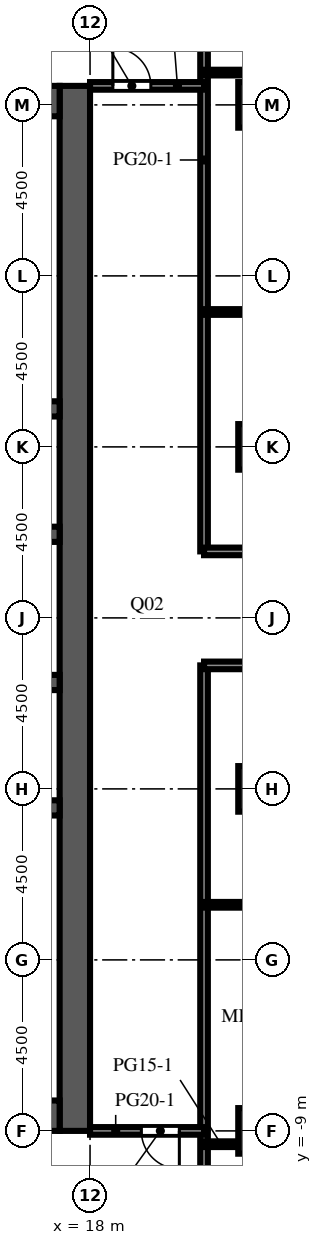
"""IFC4 building model, lengths in metres.
Left out: names, types, materials, properties, quantities, classifications, styles, units other than length and angle.
Written with IfcOpenShell. Run it as: python <this file> out.ifc"""

import sys

from ifc_helpers import new_model, si_unit, direction, frame, frame_2d, origin, origin_2d, place, context, subcontext, project, spatial, rectangle, extrude, element, fill, save


model = new_model("IFC4")
c1 = context("Model", 3, precision=1e-05, world=origin(), true_north=direction((0.0, 1.0)))
c2 = subcontext(c1, "Body", "Model", "MODEL_VIEW")
j1 = project(units=[si_unit("LENGTHUNIT", "METRE"), si_unit("PLANEANGLEUNIT", "RADIAN")], contexts=[c1])
p1 = place(None, origin())
s1 = spatial("IfcSite", under=j1, at=p1, CompositionType="ELEMENT")
p2 = place(p1, origin())
s2 = spatial("IfcBuilding", under=s1, at=p2, CompositionType="ELEMENT")
p3 = place(p2, frame((0.0, 0.0, 207.9)))
s3 = spatial("IfcBuildingStorey", under=s2, at=p3, CompositionType="ELEMENT", Elevation=207.9)
for number, where, z_axis, x_axis in (
    (1, (22.5, -9.0, 0.0), (0.0, 0.0, 1.0), (1.0, 0.0, 0.0)),
    (2, (22.5, 0.0, 0.0), (0.0, 0.0, 1.0), (1.0, 0.0, 0.0)),
    (3, (22.5, 9.0, 0.0), (0.0, 0.0, 1.0), (1.0, 0.0, 0.0)),
    (4, (22.5, 18.0, 0.0), (0.0, 0.0, 1.0), (1.0, 0.0, 0.0)),
):
    element("IfcColumn", number, at=place(p3, frame(where, z_axis=z_axis, x_axis=x_axis)), inside=s3, PredefinedType="COLUMN", context=c2, shape_type="SweptSolid", body=[
        extrude(rectangle(XDim=1.2, YDim=1.2, at=origin_2d()), origin(), (0.0, 0.0, 1.0), 4.1),
    ])
p4 = place(p3, frame((17.6, -9.0, 0.0), z_axis=(0.0, 0.0, 1.0), x_axis=(0.0, 1.0, 0.0)))
e5 = element("IfcWall", 5, at=p4, inside=s3, PredefinedType="SHEAR", context=c2, shape_type="SweptSolid", body=[
    extrude(rectangle(XDim=27.5, YDim=0.8, at=frame_2d((13.75, 0.0))), origin(), (0.0, 0.0, 1.0), 4.1),
])
p5 = place(p4, frame((12.55, 0.0, 0.0)))
e6 = element("IfcOpeningElement", 6, at=p5, cuts=e5, PredefinedType="OPENING", context=c2, shape_type="SweptSolid", body=[
    extrude(rectangle(XDim=2.4, YDim=2.4, at=frame_2d((1.2, 1.2))), frame((0.0, 0.41, 0.0), z_axis=(0.0, -1.0, 0.0), x_axis=(1.0, 0.0, 0.0)), (0.0, 0.0, 1.0), 0.82),
])
p6 = place(p4, frame((6.825, 0.0, 0.0)))
e7 = element("IfcOpeningElement", 7, at=p6, cuts=e5, PredefinedType="OPENING", context=c2, shape_type="SweptSolid", body=[
    extrude(rectangle(XDim=1.2, YDim=2.1, at=frame_2d((0.6, 1.05))), frame((0.0, 0.41, 0.0), z_axis=(0.0, -1.0, 0.0), x_axis=(1.0, 0.0, 0.0)), (0.0, 0.0, 1.0), 0.82),
])
p7 = place(p4, frame((19.475, 0.0, 0.0)))
e8 = element("IfcOpeningElement", 8, at=p7, cuts=e5, PredefinedType="OPENING", context=c2, shape_type="SweptSolid", body=[
    extrude(rectangle(XDim=1.2, YDim=2.1, at=frame_2d((0.6, 1.05))), frame((0.0, 0.41, 0.0), z_axis=(0.0, -1.0, 0.0), x_axis=(1.0, 0.0, 0.0)), (0.0, 0.0, 1.0), 0.82),
])
for number, where, z_axis, x_axis in (
    (9, (6.8, -8.6, 0.0), (0.0, 0.0, 1.0), (1.0, 0.0, 0.0)),
    (10, (6.8, 18.1, 0.0), (0.0, 0.0, 1.0), (1.0, 0.0, 0.0)),
):
    element("IfcWall", number, at=place(p3, frame(where, z_axis=z_axis, x_axis=x_axis)), inside=s3, PredefinedType="SHEAR", context=c2, shape_type="SweptSolid", body=[
        extrude(rectangle(XDim=10.4, YDim=0.8, at=frame_2d((5.2, 0.0))), origin(), (0.0, 0.0, 1.0), 4.1),
    ])
p8 = place(p3, frame((6.8, -0.5, 0.0), z_axis=(0.0, 0.0, 1.0), x_axis=(1.0, 0.0, 0.0)))
e11 = element("IfcWall", 11, at=p8, inside=s3, PredefinedType="SHEAR", context=c2, shape_type="SweptSolid", body=[
    extrude(rectangle(XDim=10.4, YDim=0.4, at=frame_2d((5.2, 0.0))), origin(), (0.0, 0.0, 1.0), 4.1),
])
p9 = place(p3, frame((6.8, 2.8, 0.0), z_axis=(0.0, 0.0, 1.0), x_axis=(1.0, 0.0, 0.0)))
e12 = element("IfcWall", 12, at=p9, inside=s3, PredefinedType="SHEAR", context=c2, shape_type="SweptSolid", body=[
    extrude(rectangle(XDim=10.4, YDim=0.4, at=frame_2d((5.2, 0.0))), origin(), (0.0, 0.0, 1.0), 4.1),
])
p10 = place(p9, frame((0.738, 0.0, 0.0)))
e13 = element("IfcOpeningElement", 13, at=p10, cuts=e12, PredefinedType="OPENING", context=c2, shape_type="SweptSolid", body=[
    extrude(rectangle(XDim=1.1, YDim=2.1, at=frame_2d((0.55, 1.05))), frame((0.0, 0.21, 0.0), z_axis=(0.0, -1.0, 0.0), x_axis=(1.0, 0.0, 0.0)), (0.0, 0.0, 1.0), 0.42),
])
p11 = place(p9, frame((3.337, 0.0, 0.0)))
e14 = element("IfcOpeningElement", 14, at=p11, cuts=e12, PredefinedType="OPENING", context=c2, shape_type="SweptSolid", body=[
    extrude(rectangle(XDim=1.1, YDim=2.1, at=frame_2d((0.55, 1.05))), frame((0.0, 0.21, 0.0), z_axis=(0.0, -1.0, 0.0), x_axis=(1.0, 0.0, 0.0)), (0.0, 0.0, 1.0), 0.42),
])
p12 = place(p9, frame((6.012, 0.0, 0.0)))
e15 = element("IfcOpeningElement", 15, at=p12, cuts=e12, PredefinedType="OPENING", context=c2, shape_type="SweptSolid", body=[
    extrude(rectangle(XDim=1.0, YDim=2.1, at=frame_2d((0.5, 1.05))), frame((0.0, 0.21, 0.0), z_axis=(0.0, -1.0, 0.0), x_axis=(1.0, 0.0, 0.0)), (0.0, 0.0, 1.0), 0.42),
])
p13 = place(p9, frame((8.613, 0.0, 0.0)))
e16 = element("IfcOpeningElement", 16, at=p13, cuts=e12, PredefinedType="OPENING", context=c2, shape_type="SweptSolid", body=[
    extrude(rectangle(XDim=1.0, YDim=2.1, at=frame_2d((0.5, 1.05))), frame((0.0, 0.21, 0.0), z_axis=(0.0, -1.0, 0.0), x_axis=(1.0, 0.0, 0.0)), (0.0, 0.0, 1.0), 0.42),
])
p14 = place(p3, frame((6.8, 6.7, 0.0), z_axis=(0.0, 0.0, 1.0), x_axis=(1.0, 0.0, 0.0)))
e17 = element("IfcWall", 17, at=p14, inside=s3, PredefinedType="SHEAR", context=c2, shape_type="SweptSolid", body=[
    extrude(rectangle(XDim=10.4, YDim=0.4, at=frame_2d((5.2, 0.0))), origin(), (0.0, 0.0, 1.0), 4.1),
])
p15 = place(p14, frame((3.337, 0.0, 0.0)))
e18 = element("IfcOpeningElement", 18, at=p15, cuts=e17, PredefinedType="OPENING", context=c2, shape_type="SweptSolid", body=[
    extrude(rectangle(XDim=1.1, YDim=2.1, at=frame_2d((0.55, 1.05))), frame((0.0, 0.21, 0.0), z_axis=(0.0, -1.0, 0.0), x_axis=(1.0, 0.0, 0.0)), (0.0, 0.0, 1.0), 0.42),
])
p16 = place(p14, frame((5.962, 0.0, 0.0)))
e19 = element("IfcOpeningElement", 19, at=p16, cuts=e17, PredefinedType="OPENING", context=c2, shape_type="SweptSolid", body=[
    extrude(rectangle(XDim=1.1, YDim=2.1, at=frame_2d((0.55, 1.05))), frame((0.0, 0.21, 0.0), z_axis=(0.0, -1.0, 0.0), x_axis=(1.0, 0.0, 0.0)), (0.0, 0.0, 1.0), 0.42),
])
p17 = place(p14, frame((8.663, 0.0, 0.0)))
e20 = element("IfcOpeningElement", 20, at=p17, cuts=e17, PredefinedType="OPENING", context=c2, shape_type="SweptSolid", body=[
    extrude(rectangle(XDim=1.1, YDim=2.1, at=frame_2d((0.55, 1.05))), frame((0.0, 0.21, 0.0), z_axis=(0.0, -1.0, 0.0), x_axis=(1.0, 0.0, 0.0)), (0.0, 0.0, 1.0), 0.42),
])
p18 = place(p14, frame((0.688, 0.0, 0.0)))
e21 = element("IfcOpeningElement", 21, at=p18, cuts=e17, PredefinedType="OPENING", context=c2, shape_type="SweptSolid", body=[
    extrude(rectangle(XDim=1.0, YDim=2.1, at=frame_2d((0.5, 1.05))), frame((0.0, 0.21, 0.0), z_axis=(0.0, -1.0, 0.0), x_axis=(1.0, 0.0, 0.0)), (0.0, 0.0, 1.0), 0.42),
])
p19 = place(p3, frame((6.8, 10.0, 0.0), z_axis=(0.0, 0.0, 1.0), x_axis=(1.0, 0.0, 0.0)))
e22 = element("IfcWall", 22, at=p19, inside=s3, PredefinedType="SHEAR", context=c2, shape_type="SweptSolid", body=[
    extrude(rectangle(XDim=10.4, YDim=0.4, at=frame_2d((5.2, 0.0))), origin(), (0.0, 0.0, 1.0), 4.1),
])
p20 = place(p3, frame((21.0, -26.85, 0.0), z_axis=(0.0, 0.0, 1.0), x_axis=(0.0, 1.0, 0.0)))
e23 = element("IfcWall", 23, at=p20, inside=s3, PredefinedType="PARTITIONING", context=c2, shape_type="SweptSolid", body=[
    extrude(rectangle(XDim=30.1, YDim=0.2, at=frame_2d((15.05, 0.0))), origin(), (0.0, 0.0, 1.0), 3.65),
])
p21 = place(p3, frame((21.0, 6.25, 0.0), z_axis=(0.0, 0.0, 1.0), x_axis=(0.0, 1.0, 0.0)))
e24 = element("IfcWall", 24, at=p21, inside=s3, PredefinedType="PARTITIONING", context=c2, shape_type="SweptSolid", body=[
    extrude(rectangle(XDim=20.6, YDim=0.2, at=frame_2d((10.3, 0.0))), origin(), (0.0, 0.0, 1.0), 3.65),
])
p22 = place(p3, frame((21.0, -9.35, 0.0), z_axis=(0.0, 0.0, 1.0), x_axis=(1.0, 0.0, 0.0)))
e25 = element("IfcWall", 25, at=p22, inside=s3, PredefinedType="PARTITIONING", context=c2, shape_type="SweptSolid", body=[
    extrude(rectangle(XDim=0.9, YDim=0.15, at=frame_2d((0.45, 0.0))), origin(), (0.0, 0.0, 1.0), 3.65),
])
p23 = place(p3, frame((21.0, -9.0, 0.0), z_axis=(0.0, 0.0, 1.0), x_axis=(-1.0, 0.0, 0.0)))
e26 = element("IfcWall", 26, at=p23, inside=s3, PredefinedType="PARTITIONING", context=c2, shape_type="SweptSolid", body=[
    extrude(rectangle(XDim=3.0, YDim=0.2, at=frame_2d((1.5, 0.0))), origin(), (0.0, 0.0, 1.0), 3.65),
])
p24 = place(p23, frame((0.65, 0.0, 0.0)))
e27 = element("IfcOpeningElement", 27, at=p24, cuts=e26, PredefinedType="OPENING", context=c2, shape_type="SweptSolid", body=[
    extrude(rectangle(XDim=1.0, YDim=2.1, at=frame_2d((0.5, 1.05))), frame((0.0, 0.11, 0.0), z_axis=(0.0, -1.0, 0.0), x_axis=(1.0, 0.0, 0.0)), (0.0, 0.0, 1.0), 0.22),
])
p25 = place(p3, frame((31.35, -3.05, 0.0), z_axis=(0.0, 0.0, 1.0), x_axis=(-1.0, 0.0, 0.0)))
e28 = element("IfcWall", 28, at=p25, inside=s3, PredefinedType="PARTITIONING", context=c2, shape_type="SweptSolid", body=[
    extrude(rectangle(XDim=10.35, YDim=0.15, at=frame_2d((5.175, 0.0))), origin(), (0.0, 0.0, 1.0), 3.65),
])
p26 = place(p25, frame((4.25, 0.0, 0.0)))
e29 = element("IfcOpeningElement", 29, at=p26, cuts=e28, PredefinedType="OPENING", context=c2, shape_type="SweptSolid", body=[
    extrude(rectangle(XDim=1.0, YDim=2.1, at=frame_2d((0.5, 1.05))), frame((0.0, 0.085, 0.0), z_axis=(0.0, -1.0, 0.0), x_axis=(1.0, 0.0, 0.0)), (0.0, 0.0, 1.0), 0.17),
])
p27 = place(p3, frame((31.35, 3.25, 0.0), z_axis=(0.0, 0.0, 1.0), x_axis=(-1.0, 0.0, 0.0)))
e30 = element("IfcWall", 30, at=p27, inside=s3, PredefinedType="PARTITIONING", context=c2, shape_type="SweptSolid", body=[
    extrude(rectangle(XDim=10.35, YDim=0.2, at=frame_2d((5.175, 0.0))), origin(), (0.0, 0.0, 1.0), 3.65),
])
p28 = place(p27, frame((5.5, 0.0, 0.0)))
e31 = element("IfcOpeningElement", 31, at=p28, cuts=e30, PredefinedType="OPENING", context=c2, shape_type="SweptSolid", body=[
    extrude(rectangle(XDim=1.0, YDim=2.1, at=frame_2d((0.5, 1.05))), frame((0.0, 0.11, 0.0), z_axis=(0.0, -1.0, 0.0), x_axis=(1.0, 0.0, 0.0)), (0.0, 0.0, 1.0), 0.22),
])
p29 = place(p3, frame((21.0, 6.25, 0.0), z_axis=(0.0, 0.0, 1.0), x_axis=(1.0, 0.0, 0.0)))
e32 = element("IfcWall", 32, at=p29, inside=s3, PredefinedType="PARTITIONING", context=c2, shape_type="SweptSolid", body=[
    extrude(rectangle(XDim=10.35, YDim=0.2, at=frame_2d((5.175, 0.0))), origin(), (0.0, 0.0, 1.0), 3.65),
])
p30 = place(p29, frame((5.6, 0.0, 0.0)))
e33 = element("IfcOpeningElement", 33, at=p30, cuts=e32, PredefinedType="OPENING", context=c2, shape_type="SweptSolid", body=[
    extrude(rectangle(XDim=1.0, YDim=2.1, at=frame_2d((0.5, 1.05))), frame((0.0, 0.11, 0.0), z_axis=(0.0, -1.0, 0.0), x_axis=(1.0, 0.0, 0.0)), (0.0, 0.0, 1.0), 0.22),
])
p31 = place(p3, frame((21.0, 12.55, 0.0), z_axis=(0.0, 0.0, 1.0), x_axis=(1.0, 0.0, 0.0)))
e34 = element("IfcWall", 34, at=p31, inside=s3, PredefinedType="PARTITIONING", context=c2, shape_type="SweptSolid", body=[
    extrude(rectangle(XDim=10.35, YDim=0.15, at=frame_2d((5.175, 0.0))), origin(), (0.0, 0.0, 1.0), 3.65),
])
p32 = place(p31, frame((4.6, 0.0, 0.0)))
e35 = element("IfcOpeningElement", 35, at=p32, cuts=e34, PredefinedType="OPENING", context=c2, shape_type="SweptSolid", body=[
    extrude(rectangle(XDim=1.0, YDim=2.1, at=frame_2d((0.5, 1.05))), frame((0.0, 0.085, 0.0), z_axis=(0.0, -1.0, 0.0), x_axis=(1.0, 0.0, 0.0)), (0.0, 0.0, 1.0), 0.17),
])
p33 = place(p3, frame((18.0, 18.5, 0.0), z_axis=(0.0, 0.0, 1.0), x_axis=(1.0, 0.0, 0.0)))
e36 = element("IfcWall", 36, at=p33, inside=s3, PredefinedType="PARTITIONING", context=c2, shape_type="SweptSolid", body=[
    extrude(rectangle(XDim=3.0, YDim=0.2, at=frame_2d((1.5, 0.0))), origin(), (0.0, 0.0, 1.0), 3.65),
])
p34 = place(p33, frame((0.6, 0.0, 0.0)))
e37 = element("IfcOpeningElement", 37, at=p34, cuts=e36, PredefinedType="OPENING", context=c2, shape_type="SweptSolid", body=[
    extrude(rectangle(XDim=1.0, YDim=2.1, at=frame_2d((0.5, 1.05))), frame((0.0, 0.11, 0.0), z_axis=(0.0, -1.0, 0.0), x_axis=(1.0, 0.0, 0.0)), (0.0, 0.0, 1.0), 0.22),
])
p35 = place(p3, frame((21.0, 18.85, 0.0), z_axis=(0.0, 0.0, 1.0), x_axis=(1.0, 0.0, 0.0)))
e38 = element("IfcWall", 38, at=p35, inside=s3, PredefinedType="PARTITIONING", context=c2, shape_type="SweptSolid", body=[
    extrude(rectangle(XDim=10.35, YDim=0.15, at=frame_2d((5.175, 0.0))), origin(), (0.0, 0.0, 1.0), 3.65),
])
p36 = place(p35, frame((6.85, 0.0, 0.0)))
e39 = element("IfcOpeningElement", 39, at=p36, cuts=e38, PredefinedType="OPENING", context=c2, shape_type="SweptSolid", body=[
    extrude(rectangle(XDim=1.0, YDim=2.1, at=frame_2d((0.5, 1.05))), frame((0.0, 0.085, 0.0), z_axis=(0.0, -1.0, 0.0), x_axis=(1.0, 0.0, 0.0)), (0.0, 0.0, 1.0), 0.17),
])
p37 = place(p5, origin())
e40 = element("IfcDoor", 40, at=p37, inside=s3, OperationType="DOUBLE_DOOR_DOUBLE_SWING", PredefinedType="DOOR", context=c2, shape_type="SweptSolid", body=[
    extrude(rectangle(XDim=2.4, YDim=2.4, at=frame_2d((1.2, 1.2))), frame((0.0, 0.025, 0.0), z_axis=(0.0, -1.0, 0.0), x_axis=(1.0, 0.0, 0.0)), (0.0, 0.0, 1.0), 0.05),
])
fill(e6, e40)
p38 = place(p6, frame((1.2, 0.0, 0.0), z_axis=(0.0, 0.0, 1.0), x_axis=(-1.0, 0.0, 0.0)))
e41 = element("IfcDoor", 41, at=p38, inside=s3, OperationType="SINGLE_SWING_LEFT", PredefinedType="DOOR", context=c2, shape_type="SweptSolid", body=[
    extrude(rectangle(XDim=1.2, YDim=2.1, at=frame_2d((0.6, 1.05))), frame((0.0, 0.025, 0.0), z_axis=(0.0, -1.0, 0.0), x_axis=(1.0, 0.0, 0.0)), (0.0, 0.0, 1.0), 0.05),
])
fill(e7, e41)
p39 = place(p7, frame((1.2, 0.0, 0.0), z_axis=(0.0, 0.0, 1.0), x_axis=(-1.0, 0.0, 0.0)))
e42 = element("IfcDoor", 42, at=p39, inside=s3, OperationType="SINGLE_SWING_LEFT", PredefinedType="DOOR", context=c2, shape_type="SweptSolid", body=[
    extrude(rectangle(XDim=1.2, YDim=2.1, at=frame_2d((0.6, 1.05))), frame((0.0, 0.025, 0.0), z_axis=(0.0, -1.0, 0.0), x_axis=(1.0, 0.0, 0.0)), (0.0, 0.0, 1.0), 0.05),
])
fill(e8, e42)
p40 = place(p24, origin())
e43 = element("IfcDoor", 43, at=p40, inside=s3, OperationType="SINGLE_SWING_LEFT", PredefinedType="DOOR", context=c2, shape_type="SweptSolid", body=[
    extrude(rectangle(XDim=1.0, YDim=2.1, at=frame_2d((0.5, 1.05))), frame((0.0, 0.025, 0.0), z_axis=(0.0, -1.0, 0.0), x_axis=(1.0, 0.0, 0.0)), (0.0, 0.0, 1.0), 0.05),
])
fill(e27, e43)
p41 = place(p34, origin())
e44 = element("IfcDoor", 44, at=p41, inside=s3, OperationType="SINGLE_SWING_LEFT", PredefinedType="DOOR", context=c2, shape_type="SweptSolid", body=[
    extrude(rectangle(XDim=1.0, YDim=2.1, at=frame_2d((0.5, 1.05))), frame((0.0, 0.025, 0.0), z_axis=(0.0, -1.0, 0.0), x_axis=(1.0, 0.0, 0.0)), (0.0, 0.0, 1.0), 0.05),
])
fill(e37, e44)
save(model, sys.argv[1])
